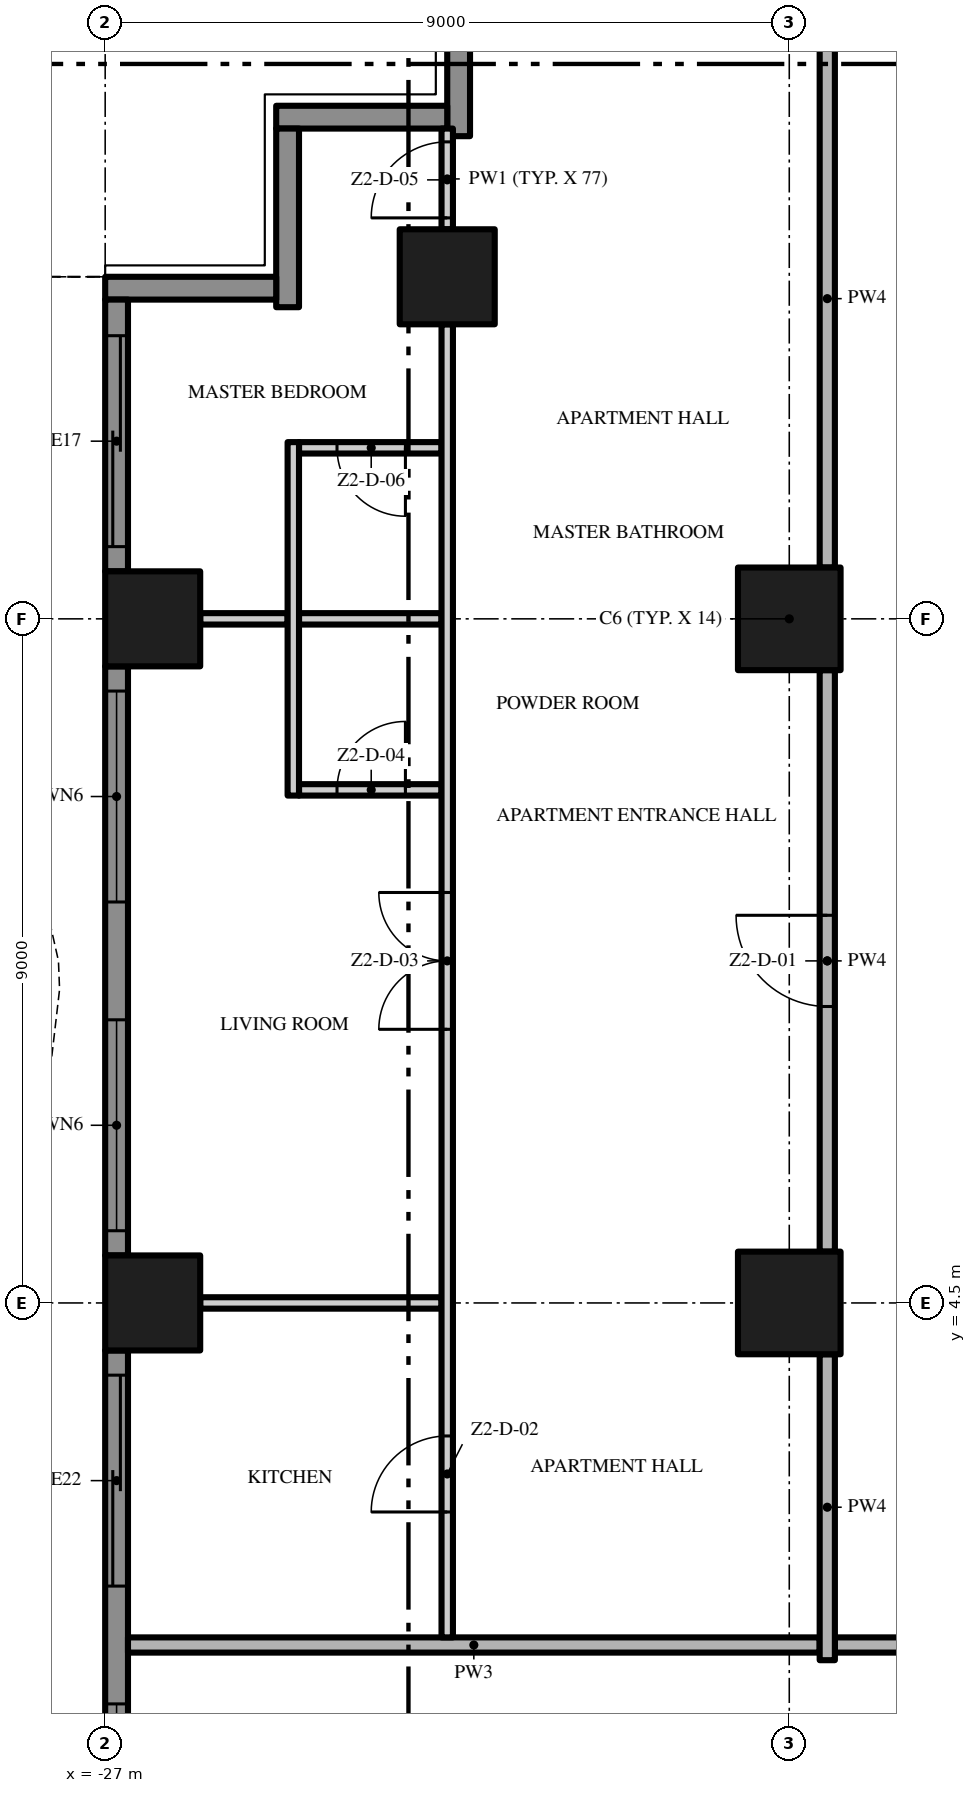
"""IFC4 building model, lengths in metres.
Left out: names, types, materials, properties, quantities, classifications, styles, units other than length and angle.
Written with IfcOpenShell. Run it as: python <this file> out.ifc"""

import sys

from ifc_helpers import new_model, si_unit, direction, frame, frame_2d, origin, origin_2d, place, context, subcontext, project, spatial, polyline, rectangle, outline, extrude, element, fill, save


model = new_model("IFC4")
c1 = context("Model", 3, precision=1e-05, world=origin(), true_north=direction((0.0, 1.0)))
c2 = subcontext(c1, "Body", "Model", "MODEL_VIEW")
j1 = project(units=[si_unit("LENGTHUNIT", "METRE"), si_unit("PLANEANGLEUNIT", "RADIAN")], contexts=[c1])
p1 = place(None, origin())
s1 = spatial("IfcSite", under=j1, at=p1, CompositionType="ELEMENT")
p2 = place(p1, origin())
s2 = spatial("IfcBuilding", under=s1, at=p2, CompositionType="ELEMENT")
p3 = place(p2, frame((0.0, 0.0, 111.2)))
s3 = spatial("IfcBuildingStorey", under=s2, at=p3, CompositionType="ELEMENT", Elevation=111.2)
for number, where, z_axis, x_axis in (
    (1, (-18.0, 13.5, 0.0), (0.0, 0.0, 1.0), (1.0, 0.0, 0.0)),
    (2, (-18.0, 4.5, 0.0), (0.0, 0.0, 1.0), (1.0, 0.0, 0.0)),
):
    element("IfcColumn", number, at=place(p3, frame(where, z_axis=z_axis, x_axis=x_axis)), inside=s3, PredefinedType="COLUMN", context=c2, shape_type="SweptSolid", body=[
        extrude(rectangle(XDim=1.35, YDim=1.35, at=origin_2d()), origin(), (0.0, 0.0, 1.0), 3.5),
    ])
for number, where, z_axis, x_axis in (
    (3, (-26.375, 13.5, 0.0), (0.0, 0.0, 1.0), (1.0, 0.0, 0.0)),
    (4, (-22.5, 18.0, 0.0), (0.0, 0.0, 1.0), (1.0, 0.0, 0.0)),
    (5, (-26.375, 4.5, 0.0), (0.0, 0.0, 1.0), (1.0, 0.0, 0.0)),
):
    element("IfcColumn", number, at=place(p3, frame(where, z_axis=z_axis, x_axis=x_axis)), inside=s3, PredefinedType="COLUMN", context=c2, shape_type="SweptSolid", body=[
        extrude(rectangle(XDim=1.25, YDim=1.25, at=origin_2d()), origin(), (0.0, 0.0, 1.0), 3.5),
    ])
p4 = place(p3, frame((-22.35, 19.85, 0.0), z_axis=(0.0, 0.0, 1.0), x_axis=(0.0, 1.0, 0.0)))
e6 = element("IfcWall", 6, at=p4, inside=s3, PredefinedType="SOLIDWALL", context=c2, shape_type="SweptSolid", body=[
    extrude(rectangle(XDim=2.35, YDim=0.3, at=frame_2d((1.175, 0.0))), origin(), (0.0, 0.0, 1.0), 3.5),
])
p5 = place(p3, frame((-24.75, 20.1, 0.0), z_axis=(0.0, 0.0, 1.0), x_axis=(1.0, 0.0, 0.0)))
e7 = element("IfcWall", 7, at=p5, inside=s3, PredefinedType="SOLIDWALL", context=c2, shape_type="SweptSolid", body=[
    extrude(rectangle(XDim=2.25, YDim=0.3, at=frame_2d((1.125, 0.0))), origin(), (0.0, 0.0, 1.0), 3.5),
])
p6 = place(p3, frame((-24.6, 17.6, 0.0), z_axis=(0.0, 0.0, 1.0), x_axis=(0.0, 1.0, 0.0)))
e8 = element("IfcWall", 8, at=p6, inside=s3, PredefinedType="SOLIDWALL", context=c2, shape_type="SweptSolid", body=[
    extrude(rectangle(XDim=2.35, YDim=0.3, at=frame_2d((1.175, 0.0))), origin(), (0.0, 0.0, 1.0), 3.5),
])
p7 = place(p3, frame((-27.0, 17.85, 0.0), z_axis=(0.0, 0.0, 1.0), x_axis=(1.0, 0.0, 0.0)))
e9 = element("IfcWall", 9, at=p7, inside=s3, PredefinedType="SOLIDWALL", context=c2, shape_type="SweptSolid", body=[
    extrude(rectangle(XDim=2.25, YDim=0.3, at=frame_2d((1.125, 0.0))), origin(), (0.0, 0.0, 1.0), 3.5),
])
p8 = place(p3, frame((-26.85, 14.125, 0.0), z_axis=(0.0, 0.0, 1.0), x_axis=(0.0, 1.0, 0.0)))
e10 = element("IfcWall", 10, at=p8, inside=s3, PredefinedType="SOLIDWALL", context=c2, shape_type="SweptSolid", body=[
    extrude(rectangle(XDim=3.575, YDim=0.3, at=frame_2d((1.788, 0.0))), origin(), (0.0, 0.0, 1.0), 3.5),
])
p9 = place(p8, frame((0.325, 0.0, 0.0)))
e11 = element("IfcOpeningElement", 11, at=p9, cuts=e10, PredefinedType="OPENING", context=c2, shape_type="SweptSolid", body=[
    extrude(rectangle(XDim=2.775, YDim=2.4, at=frame_2d((1.387, 1.2))), frame((0.0, 0.16, 0.0), z_axis=(0.0, -1.0, 0.0), x_axis=(1.0, 0.0, 0.0)), (0.0, 0.0, 1.0), 0.32),
])
p10 = place(p3, frame((-26.85, 5.125, 0.0), z_axis=(0.0, 0.0, 1.0), x_axis=(0.0, 1.0, 0.0)))
e12 = element("IfcWall", 12, at=p10, inside=s3, PredefinedType="SOLIDWALL", context=c2, shape_type="SweptSolid", body=[
    extrude(rectangle(XDim=7.75, YDim=0.3, at=frame_2d((3.875, 0.0))), origin(), (0.0, 0.0, 1.0), 3.5),
])
p11 = place(p10, frame((4.65, 0.0, 0.45)))
e13 = element("IfcOpeningElement", 13, at=p11, cuts=e12, PredefinedType="OPENING", context=c2, shape_type="SweptSolid", body=[
    extrude(rectangle(XDim=2.775, YDim=2.65, at=frame_2d((1.387, 1.325))), frame((0.0, 0.16, 0.0), z_axis=(0.0, -1.0, 0.0), x_axis=(1.0, 0.0, 0.0)), (0.0, 0.0, 1.0), 0.32),
])
p12 = place(p10, frame((0.325, 0.0, 0.45)))
e14 = element("IfcOpeningElement", 14, at=p12, cuts=e12, PredefinedType="OPENING", context=c2, shape_type="SweptSolid", body=[
    extrude(rectangle(XDim=2.775, YDim=2.65, at=frame_2d((1.387, 1.325))), frame((0.0, 0.16, 0.0), z_axis=(0.0, -1.0, 0.0), x_axis=(1.0, 0.0, 0.0)), (0.0, 0.0, 1.0), 0.32),
])
p13 = place(p3, frame((-26.85, -3.875, 0.0), z_axis=(0.0, 0.0, 1.0), x_axis=(0.0, 1.0, 0.0)))
e15 = element("IfcWall", 15, at=p13, inside=s3, PredefinedType="SOLIDWALL", context=c2, shape_type="SweptSolid", body=[
    extrude(rectangle(XDim=7.75, YDim=0.3, at=frame_2d((3.875, 0.0))), origin(), (0.0, 0.0, 1.0), 3.5),
])
p14 = place(p13, frame((4.65, 0.0, 0.0)))
e16 = element("IfcOpeningElement", 16, at=p14, cuts=e15, PredefinedType="OPENING", context=c2, shape_type="SweptSolid", body=[
    extrude(rectangle(XDim=2.775, YDim=2.4, at=frame_2d((1.387, 1.2))), frame((0.0, 0.16, 0.0), z_axis=(0.0, -1.0, 0.0), x_axis=(1.0, 0.0, 0.0)), (0.0, 0.0, 1.0), 0.32),
])
p15 = place(p13, frame((0.325, 0.0, 0.45)))
e17 = element("IfcOpeningElement", 17, at=p15, cuts=e15, PredefinedType="OPENING", context=c2, shape_type="SweptSolid", body=[
    extrude(rectangle(XDim=2.775, YDim=2.65, at=frame_2d((1.387, 1.325))), frame((0.0, 0.16, 0.0), z_axis=(0.0, -1.0, 0.0), x_axis=(1.0, 0.0, 0.0)), (0.0, 0.0, 1.0), 0.32),
])
p16 = place(p3, origin())
e18 = element("IfcWall", 18, at=p16, inside=s3, PredefinedType="USERDEFINED", context=c2, shape_type="SweptSolid", body=[
    extrude(outline(polyline([(-29.649, 18.0), (-29.985, 16.5), (-30.0, 16.125), (-29.869, 15.0), (-29.345, 13.5), (-28.612, 12.0), (-27.951, 10.5), (-27.615, 9.0), (-27.6, 8.625), (-27.731, 7.5), (-28.255, 6.0), (-28.988, 4.5), (-29.649, 3.0), (-29.985, 1.5), (-30.0, 1.125), (-29.869, 0.0), (-29.345, -1.5), (-28.612, -3.0), (-27.951, -4.5), (-27.615, -6.0), (-27.6, -6.375), (-27.731, -7.5), (-28.255, -9.0), (-28.988, -10.5), (-29.649, -12.0), (-29.985, -13.5), (-30.0, -13.875), (-29.869, -15.0), (-29.345, -16.5), (-28.612, -18.0), (-28.388, -17.89), (-29.114, -16.404), (-29.624, -14.944), (-29.749, -13.865), (-29.736, -13.533), (-29.41, -12.079), (-28.761, -10.605), (-28.024, -9.096), (-27.486, -7.556), (-27.349, -6.385), (-27.366, -5.967), (-27.713, -4.421), (-28.385, -2.895), (-29.114, -1.404), (-29.624, 0.056), (-29.749, 1.135), (-29.736, 1.467), (-29.41, 2.921), (-28.761, 4.395), (-28.024, 5.904), (-27.486, 7.444), (-27.349, 8.615), (-27.366, 9.033), (-27.713, 10.579), (-28.385, 12.105), (-29.114, 13.596), (-29.624, 15.056), (-29.749, 16.135), (-29.736, 16.467), (-29.405, 17.945), (-29.649, 18.0)])), origin(), (0.0, 0.0, 1.0), 0.9),
])
p17 = place(p3, frame((-0.1, 0.0, 0.0), z_axis=(0.0, 0.0, 1.0), x_axis=(-1.0, 0.0, 0.0)))
e19 = element("IfcWall", 19, at=p17, inside=s3, PredefinedType="PARTITIONING", context=c2, shape_type="SweptSolid", body=[
    extrude(rectangle(XDim=17.3, YDim=0.2, at=frame_2d((8.65, 0.0))), origin(), (0.0, 0.0, 1.0), 3.5),
])
p18 = place(p17, frame((8.15, 0.0, 0.0)))
e20 = element("IfcOpeningElement", 20, at=p18, cuts=e19, PredefinedType="OPENING", context=c2, shape_type="SweptSolid", body=[
    extrude(rectangle(XDim=1.5, YDim=2.4, at=frame_2d((0.75, 1.2))), frame((0.0, 0.11, 0.0), z_axis=(0.0, -1.0, 0.0), x_axis=(1.0, 0.0, 0.0)), (0.0, 0.0, 1.0), 0.22),
])
p19 = place(p3, frame((-26.7, 0.0, 0.0), z_axis=(0.0, 0.0, 1.0), x_axis=(1.0, 0.0, 0.0)))
e21 = element("IfcWall", 21, at=p19, inside=s3, PredefinedType="PARTITIONING", context=c2, shape_type="SweptSolid", body=[
    extrude(rectangle(XDim=9.1, YDim=0.2, at=frame_2d((4.55, 0.0))), origin(), (0.0, 0.0, 1.0), 3.5),
])
p20 = place(p3, frame((-25.75, 4.5, 0.0), z_axis=(0.0, 0.0, 1.0), x_axis=(1.0, 0.0, 0.0)))
e22 = element("IfcWall", 22, at=p20, inside=s3, PredefinedType="PARTITIONING", context=c2, shape_type="SweptSolid", body=[
    extrude(rectangle(XDim=3.175, YDim=0.15, at=frame_2d((1.587, 0.0))), origin(), (0.0, 0.0, 1.0), 3.5),
])
p21 = place(p3, frame((-24.45, 11.25, 0.0), z_axis=(0.0, 0.0, 1.0), x_axis=(1.0, 0.0, 0.0)))
e23 = element("IfcWall", 23, at=p21, inside=s3, PredefinedType="PARTITIONING", context=c2, shape_type="SweptSolid", body=[
    extrude(rectangle(XDim=1.875, YDim=0.15, at=frame_2d((0.938, 0.0))), origin(), (0.0, 0.0, 1.0), 3.5),
])
p22 = place(p21, frame((0.5, 0.0, 0.0)))
e24 = element("IfcOpeningElement", 24, at=p22, cuts=e23, PredefinedType="OPENING", context=c2, shape_type="SweptSolid", body=[
    extrude(rectangle(XDim=0.9, YDim=2.1, at=frame_2d((0.45, 1.05))), frame((0.0, 0.085, 0.0), z_axis=(0.0, -1.0, 0.0), x_axis=(1.0, 0.0, 0.0)), (0.0, 0.0, 1.0), 0.17),
])
p23 = place(p3, frame((-25.75, 13.5, 0.0), z_axis=(0.0, 0.0, 1.0), x_axis=(1.0, 0.0, 0.0)))
e25 = element("IfcWall", 25, at=p23, inside=s3, PredefinedType="PARTITIONING", context=c2, shape_type="SweptSolid", body=[
    extrude(rectangle(XDim=1.15, YDim=0.15, at=frame_2d((0.575, 0.0))), origin(), (0.0, 0.0, 1.0), 3.5),
])
p24 = place(p3, frame((-24.45, 13.5, 0.0), z_axis=(0.0, 0.0, 1.0), x_axis=(1.0, 0.0, 0.0)))
e26 = element("IfcWall", 26, at=p24, inside=s3, PredefinedType="PARTITIONING", context=c2, shape_type="SweptSolid", body=[
    extrude(rectangle(XDim=1.875, YDim=0.15, at=frame_2d((0.938, 0.0))), origin(), (0.0, 0.0, 1.0), 3.5),
])
p25 = place(p3, frame((-22.575, 15.75, 0.0), z_axis=(0.0, 0.0, 1.0), x_axis=(-1.0, 0.0, 0.0)))
e27 = element("IfcWall", 27, at=p25, inside=s3, PredefinedType="PARTITIONING", context=c2, shape_type="SweptSolid", body=[
    extrude(rectangle(XDim=1.875, YDim=0.15, at=frame_2d((0.938, 0.0))), origin(), (0.0, 0.0, 1.0), 3.5),
])
p26 = place(p25, frame((0.475, 0.0, 0.0)))
e28 = element("IfcOpeningElement", 28, at=p26, cuts=e27, PredefinedType="OPENING", context=c2, shape_type="SweptSolid", body=[
    extrude(rectangle(XDim=0.9, YDim=2.1, at=frame_2d((0.45, 1.05))), frame((0.0, 0.085, 0.0), z_axis=(0.0, -1.0, 0.0), x_axis=(1.0, 0.0, 0.0)), (0.0, 0.0, 1.0), 0.17),
])
p27 = place(p3, frame((-24.525, 11.175, 0.0), z_axis=(0.0, 0.0, 1.0), x_axis=(0.0, 1.0, 0.0)))
e29 = element("IfcWall", 29, at=p27, inside=s3, PredefinedType="PARTITIONING", context=c2, shape_type="SweptSolid", body=[
    extrude(rectangle(XDim=4.65, YDim=0.15, at=frame_2d((2.325, 0.0))), origin(), (0.0, 0.0, 1.0), 3.5),
])
p28 = place(p3, frame((-22.5, 0.1, 0.0), z_axis=(0.0, 0.0, 1.0), x_axis=(0.0, 1.0, 0.0)))
e30 = element("IfcWall", 30, at=p28, inside=s3, PredefinedType="PARTITIONING", context=c2, shape_type="SweptSolid", body=[
    extrude(rectangle(XDim=17.275, YDim=0.15, at=frame_2d((8.637, 0.0))), origin(), (0.0, 0.0, 1.0), 3.5),
])
p29 = place(p28, frame((1.65, 0.0, 0.0)))
e31 = element("IfcOpeningElement", 31, at=p29, cuts=e30, PredefinedType="OPENING", context=c2, shape_type="SweptSolid", body=[
    extrude(rectangle(XDim=1.0, YDim=2.4, at=frame_2d((0.5, 1.2))), frame((0.0, 0.085, 0.0), z_axis=(0.0, -1.0, 0.0), x_axis=(1.0, 0.0, 0.0)), (0.0, 0.0, 1.0), 0.17),
])
p30 = place(p28, frame((8.0, 0.0, 0.0)))
e32 = element("IfcOpeningElement", 32, at=p30, cuts=e30, PredefinedType="OPENING", context=c2, shape_type="SweptSolid", body=[
    extrude(rectangle(XDim=1.8, YDim=2.4, at=frame_2d((0.9, 1.2))), frame((0.0, 0.085, 0.0), z_axis=(0.0, -1.0, 0.0), x_axis=(1.0, 0.0, 0.0)), (0.0, 0.0, 1.0), 0.17),
])
p31 = place(p3, frame((-22.5, 18.625, 0.0), z_axis=(0.0, 0.0, 1.0), x_axis=(0.0, 1.0, 0.0)))
e33 = element("IfcWall", 33, at=p31, inside=s3, PredefinedType="PARTITIONING", context=c2, shape_type="SweptSolid", body=[
    extrude(rectangle(XDim=1.325, YDim=0.15, at=frame_2d((0.662, 0.0))), origin(), (0.0, 0.0, 1.0), 3.5),
])
p32 = place(p31, frame((0.15, 0.0, 0.0)))
e34 = element("IfcOpeningElement", 34, at=p32, cuts=e33, PredefinedType="OPENING", context=c2, shape_type="SweptSolid", body=[
    extrude(rectangle(XDim=1.0, YDim=2.4, at=frame_2d((0.5, 1.2))), frame((0.0, 0.085, 0.0), z_axis=(0.0, -1.0, 0.0), x_axis=(1.0, 0.0, 0.0)), (0.0, 0.0, 1.0), 0.17),
])
p33 = place(p3, frame((-17.5, -0.2, 0.0), z_axis=(0.0, 0.0, 1.0), x_axis=(0.0, 1.0, 0.0)))
e35 = element("IfcWall", 35, at=p33, inside=s3, PredefinedType="PARTITIONING", context=c2, shape_type="SweptSolid", body=[
    extrude(rectangle(XDim=4.025, YDim=0.2, at=frame_2d((2.013, 0.0))), origin(), (0.0, 0.0, 1.0), 3.5),
])
p34 = place(p3, frame((-17.5, 5.175, 0.0), z_axis=(0.0, 0.0, 1.0), x_axis=(0.0, 1.0, 0.0)))
e36 = element("IfcWall", 36, at=p34, inside=s3, PredefinedType="PARTITIONING", context=c2, shape_type="SweptSolid", body=[
    extrude(rectangle(XDim=7.65, YDim=0.2, at=frame_2d((3.825, 0.0))), origin(), (0.0, 0.0, 1.0), 3.5),
])
p35 = place(p34, frame((3.225, 0.0, 0.0)))
e37 = element("IfcOpeningElement", 37, at=p35, cuts=e36, PredefinedType="OPENING", context=c2, shape_type="SweptSolid", body=[
    extrude(rectangle(XDim=1.2, YDim=2.4, at=frame_2d((0.6, 1.2))), frame((0.0, 0.11, 0.0), z_axis=(0.0, -1.0, 0.0), x_axis=(1.0, 0.0, 0.0)), (0.0, 0.0, 1.0), 0.22),
])
p36 = place(p3, frame((-17.5, 14.175, 0.0), z_axis=(0.0, 0.0, 1.0), x_axis=(0.0, 1.0, 0.0)))
e38 = element("IfcWall", 38, at=p36, inside=s3, PredefinedType="PARTITIONING", context=c2, shape_type="SweptSolid", body=[
    extrude(rectangle(XDim=7.075, YDim=0.2, at=frame_2d((3.538, 0.0))), origin(), (0.0, 0.0, 1.0), 3.5),
])
p37 = place(p9, origin())
e39 = element("IfcDoor", 39, at=p37, inside=s3, OperationType="SINGLE_SWING_LEFT", PredefinedType="DOOR", context=c2, shape_type="SweptSolid", body=[
    extrude(rectangle(XDim=2.775, YDim=2.4, at=frame_2d((1.387, 1.2))), frame((0.0, 0.025, 0.0), z_axis=(0.0, -1.0, 0.0), x_axis=(1.0, 0.0, 0.0)), (0.0, 0.0, 1.0), 0.05),
])
fill(e11, e39)
p38 = place(p11, origin())
e40 = element("IfcWindow", 40, at=p38, inside=s3, PartitioningType="SINGLE_PANEL", PredefinedType="WINDOW", context=c2, shape_type="SweptSolid", body=[
    extrude(rectangle(XDim=2.775, YDim=2.65, at=frame_2d((1.387, 1.325))), frame((0.0, 0.03, 0.0), z_axis=(0.0, -1.0, 0.0), x_axis=(1.0, 0.0, 0.0)), (0.0, 0.0, 1.0), 0.06),
])
fill(e13, e40)
p39 = place(p12, origin())
e41 = element("IfcWindow", 41, at=p39, inside=s3, PartitioningType="SINGLE_PANEL", PredefinedType="WINDOW", context=c2, shape_type="SweptSolid", body=[
    extrude(rectangle(XDim=2.775, YDim=2.65, at=frame_2d((1.387, 1.325))), frame((0.0, 0.03, 0.0), z_axis=(0.0, -1.0, 0.0), x_axis=(1.0, 0.0, 0.0)), (0.0, 0.0, 1.0), 0.06),
])
fill(e14, e41)
p40 = place(p14, origin())
e42 = element("IfcDoor", 42, at=p40, inside=s3, OperationType="SINGLE_SWING_LEFT", PredefinedType="DOOR", context=c2, shape_type="SweptSolid", body=[
    extrude(rectangle(XDim=2.775, YDim=2.4, at=frame_2d((1.387, 1.2))), frame((0.0, 0.025, 0.0), z_axis=(0.0, -1.0, 0.0), x_axis=(1.0, 0.0, 0.0)), (0.0, 0.0, 1.0), 0.05),
])
fill(e16, e42)
p41 = place(p15, origin())
e43 = element("IfcWindow", 43, at=p41, inside=s3, PartitioningType="SINGLE_PANEL", PredefinedType="WINDOW", context=c2, shape_type="SweptSolid", body=[
    extrude(rectangle(XDim=2.775, YDim=2.65, at=frame_2d((1.387, 1.325))), frame((0.0, 0.03, 0.0), z_axis=(0.0, -1.0, 0.0), x_axis=(1.0, 0.0, 0.0)), (0.0, 0.0, 1.0), 0.06),
])
fill(e17, e43)
p42 = place(p35, origin())
e44 = element("IfcDoor", 44, at=p42, inside=s3, OperationType="SINGLE_SWING_RIGHT", PredefinedType="DOOR", context=c2, shape_type="SweptSolid", body=[
    extrude(rectangle(XDim=1.2, YDim=2.4, at=frame_2d((0.6, 1.2))), frame((0.0, 0.025, 0.0), z_axis=(0.0, -1.0, 0.0), x_axis=(1.0, 0.0, 0.0)), (0.0, 0.0, 1.0), 0.05),
])
fill(e37, e44)
p43 = place(p29, origin())
e45 = element("IfcDoor", 45, at=p43, inside=s3, OperationType="SINGLE_SWING_LEFT", PredefinedType="DOOR", context=c2, shape_type="SweptSolid", body=[
    extrude(rectangle(XDim=1.0, YDim=2.4, at=frame_2d((0.5, 1.2))), frame((0.0, 0.025, 0.0), z_axis=(0.0, -1.0, 0.0), x_axis=(1.0, 0.0, 0.0)), (0.0, 0.0, 1.0), 0.05),
])
fill(e31, e45)
p44 = place(p30, origin())
e46 = element("IfcDoor", 46, at=p44, inside=s3, OperationType="DOUBLE_DOOR_SINGLE_SWING", PredefinedType="DOOR", context=c2, shape_type="SweptSolid", body=[
    extrude(rectangle(XDim=1.8, YDim=2.4, at=frame_2d((0.9, 1.2))), frame((0.0, 0.025, 0.0), z_axis=(0.0, -1.0, 0.0), x_axis=(1.0, 0.0, 0.0)), (0.0, 0.0, 1.0), 0.05),
])
fill(e32, e46)
p45 = place(p22, origin())
e47 = element("IfcDoor", 47, at=p45, inside=s3, OperationType="SINGLE_SWING_RIGHT", PredefinedType="DOOR", context=c2, shape_type="SweptSolid", body=[
    extrude(rectangle(XDim=0.9, YDim=2.1, at=frame_2d((0.45, 1.05))), frame((0.0, 0.025, 0.0), z_axis=(0.0, -1.0, 0.0), x_axis=(1.0, 0.0, 0.0)), (0.0, 0.0, 1.0), 0.05),
])
fill(e24, e47)
p46 = place(p32, origin())
e48 = element("IfcDoor", 48, at=p46, inside=s3, OperationType="SINGLE_SWING_LEFT", PredefinedType="DOOR", context=c2, shape_type="SweptSolid", body=[
    extrude(rectangle(XDim=1.0, YDim=2.4, at=frame_2d((0.5, 1.2))), frame((0.0, 0.025, 0.0), z_axis=(0.0, -1.0, 0.0), x_axis=(1.0, 0.0, 0.0)), (0.0, 0.0, 1.0), 0.05),
])
fill(e34, e48)
p47 = place(p26, origin())
e49 = element("IfcDoor", 49, at=p47, inside=s3, OperationType="SINGLE_SWING_LEFT", PredefinedType="DOOR", context=c2, shape_type="SweptSolid", body=[
    extrude(rectangle(XDim=0.9, YDim=2.1, at=frame_2d((0.45, 1.05))), frame((0.0, 0.025, 0.0), z_axis=(0.0, -1.0, 0.0), x_axis=(1.0, 0.0, 0.0)), (0.0, 0.0, 1.0), 0.05),
])
fill(e28, e49)
save(model, sys.argv[1])
